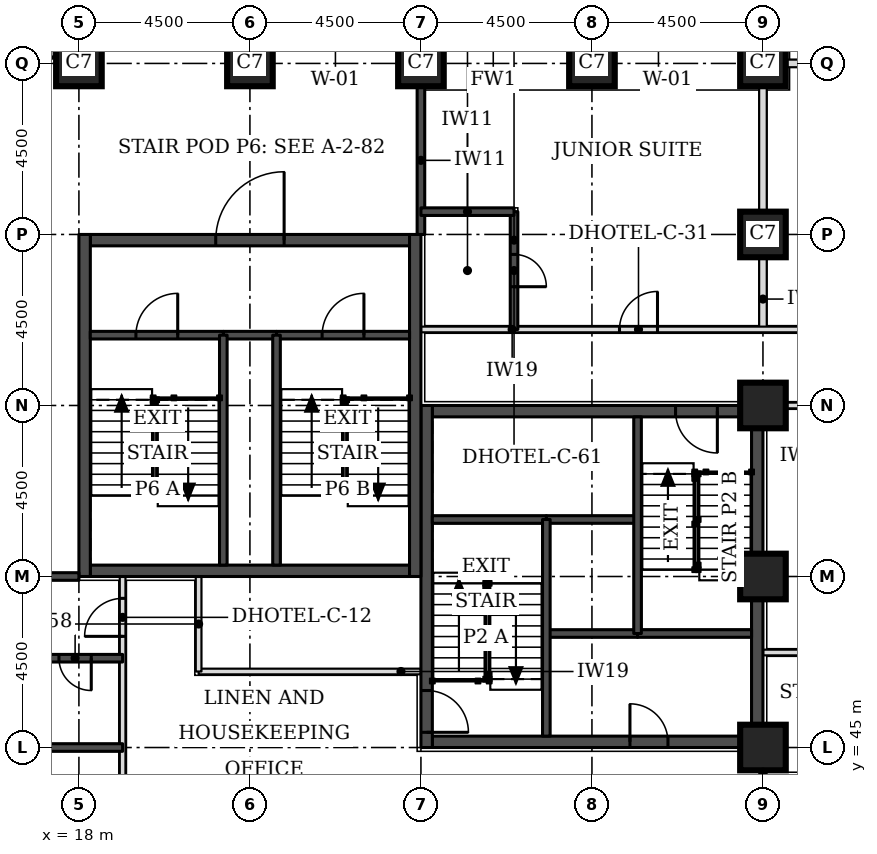
"""IFC4 building model, lengths in metres.
Left out: names, types, materials, properties, quantities, classifications, styles, units other than length and angle.
Written with IfcOpenShell. Run it as: python <this file> out.ifc"""

import sys

from ifc_helpers import new_model, si_unit, direction, frame, frame_2d, origin, origin_2d, place, context, subcontext, project, spatial, rectangle, extrude, element, fill, save


model = new_model("IFC4")
c1 = context("Model", 3, precision=1e-05, world=origin(), true_north=direction((0.0, 1.0)))
c2 = subcontext(c1, "Body", "Model", "MODEL_VIEW")
j1 = project(units=[si_unit("LENGTHUNIT", "METRE"), si_unit("PLANEANGLEUNIT", "RADIAN")], contexts=[c1])
p1 = place(None, origin())
s1 = spatial("IfcSite", under=j1, at=p1, CompositionType="ELEMENT")
p2 = place(p1, origin())
s2 = spatial("IfcBuilding", under=s1, at=p2, CompositionType="ELEMENT")
p3 = place(p2, frame((0.0, 0.0, 56.1)))
s3 = spatial("IfcBuildingStorey", under=s2, at=p3, CompositionType="ELEMENT", Elevation=56.1)
for number, where, z_axis, x_axis in (
    (1, (36.0, 45.0, 0.0), (0.0, 0.0, 1.0), (1.0, 0.0, 0.0)),
    (2, (36.0, 49.5, 0.0), (0.0, 0.0, 1.0), (1.0, 0.0, 0.0)),
    (3, (36.0, 54.0, 0.0), (0.0, 0.0, 1.0), (1.0, 0.0, 0.0)),
    (4, (36.0, 58.5, 0.0), (0.0, 0.0, 1.0), (1.0, 0.0, 0.0)),
    (5, (18.0, 63.0, 0.0), (0.0, 0.0, 1.0), (1.0, 0.0, 0.0)),
    (6, (22.5, 63.0, 0.0), (0.0, 0.0, 1.0), (1.0, 0.0, 0.0)),
    (7, (27.0, 63.0, 0.0), (0.0, 0.0, 1.0), (1.0, 0.0, 0.0)),
    (8, (31.5, 63.0, 0.0), (0.0, 0.0, 1.0), (1.0, 0.0, 0.0)),
    (9, (36.0, 63.0, 0.0), (0.0, 0.0, 1.0), (1.0, 0.0, 0.0)),
):
    element("IfcColumn", number, at=place(p3, frame(where, z_axis=z_axis, x_axis=x_axis)), inside=s3, PredefinedType="COLUMN", context=c2, shape_type="SweptSolid", body=[
        extrude(rectangle(XDim=1.2, YDim=1.2, at=origin_2d()), origin(), (0.0, 0.0, 1.0), 3.3),
    ])
p4 = place(p3, frame((27.3, 45.15, 0.0), z_axis=(0.0, 0.0, 1.0), x_axis=(1.0, 0.0, 0.0)))
e10 = element("IfcWall", 10, at=p4, inside=s3, PredefinedType="SHEAR", context=c2, shape_type="SweptSolid", body=[
    extrude(rectangle(XDim=8.4, YDim=0.3, at=frame_2d((4.2, 0.0))), origin(), (0.0, 0.0, 1.0), 3.3),
])
p5 = place(p4, frame((5.2, 0.0, 0.0)))
e11 = element("IfcOpeningElement", 11, at=p5, cuts=e10, PredefinedType="OPENING", context=c2, shape_type="SweptSolid", body=[
    extrude(rectangle(XDim=1.0, YDim=2.1, at=frame_2d((0.5, 1.05))), frame((0.0, 0.16, 0.0), z_axis=(0.0, -1.0, 0.0), x_axis=(1.0, 0.0, 0.0)), (0.0, 0.0, 1.0), 0.32),
])
p6 = place(p3, frame((27.3, 53.85, 0.0), z_axis=(0.0, 0.0, 1.0), x_axis=(1.0, 0.0, 0.0)))
e12 = element("IfcWall", 12, at=p6, inside=s3, PredefinedType="SHEAR", context=c2, shape_type="SweptSolid", body=[
    extrude(rectangle(XDim=8.4, YDim=0.3, at=frame_2d((4.2, 0.0))), origin(), (0.0, 0.0, 1.0), 3.3),
])
p7 = place(p6, frame((6.4, 0.0, 0.0)))
e13 = element("IfcOpeningElement", 13, at=p7, cuts=e12, PredefinedType="OPENING", context=c2, shape_type="SweptSolid", body=[
    extrude(rectangle(XDim=1.1, YDim=2.1, at=frame_2d((0.55, 1.05))), frame((0.0, 0.16, 0.0), z_axis=(0.0, -1.0, 0.0), x_axis=(1.0, 0.0, 0.0)), (0.0, 0.0, 1.0), 0.32),
])
p8 = place(p3, frame((27.15, 45.0, 0.0), z_axis=(0.0, 0.0, 1.0), x_axis=(0.0, 1.0, 0.0)))
e14 = element("IfcWall", 14, at=p8, inside=s3, PredefinedType="SHEAR", context=c2, shape_type="SweptSolid", body=[
    extrude(rectangle(XDim=9.0, YDim=0.3, at=frame_2d((4.5, 0.0))), origin(), (0.0, 0.0, 1.0), 3.3),
])
p9 = place(p8, frame((0.4, 0.0, 0.0)))
e15 = element("IfcOpeningElement", 15, at=p9, cuts=e14, PredefinedType="OPENING", context=c2, shape_type="SweptSolid", body=[
    extrude(rectangle(XDim=1.1, YDim=2.1, at=frame_2d((0.55, 1.05))), frame((0.0, 0.16, 0.0), z_axis=(0.0, -1.0, 0.0), x_axis=(1.0, 0.0, 0.0)), (0.0, 0.0, 1.0), 0.32),
])
p10 = place(p3, frame((35.85, 45.0, 0.0), z_axis=(0.0, 0.0, 1.0), x_axis=(0.0, 1.0, 0.0)))
e16 = element("IfcWall", 16, at=p10, inside=s3, PredefinedType="SHEAR", context=c2, shape_type="SweptSolid", body=[
    extrude(rectangle(XDim=9.0, YDim=0.3, at=frame_2d((4.5, 0.0))), origin(), (0.0, 0.0, 1.0), 3.3),
])
p11 = place(p3, frame((18.3, 49.65, 0.0), z_axis=(0.0, 0.0, 1.0), x_axis=(1.0, 0.0, 0.0)))
e17 = element("IfcWall", 17, at=p11, inside=s3, PredefinedType="SHEAR", context=c2, shape_type="SweptSolid", body=[
    extrude(rectangle(XDim=8.4, YDim=0.3, at=frame_2d((4.2, 0.0))), origin(), (0.0, 0.0, 1.0), 3.3),
])
p12 = place(p3, frame((18.3, 58.35, 0.0), z_axis=(0.0, 0.0, 1.0), x_axis=(1.0, 0.0, 0.0)))
e18 = element("IfcWall", 18, at=p12, inside=s3, PredefinedType="SHEAR", context=c2, shape_type="SweptSolid", body=[
    extrude(rectangle(XDim=8.4, YDim=0.3, at=frame_2d((4.2, 0.0))), origin(), (0.0, 0.0, 1.0), 3.3),
])
p13 = place(p12, frame((3.3, 0.0, 0.0)))
e19 = element("IfcOpeningElement", 19, at=p13, cuts=e18, PredefinedType="OPENING", context=c2, shape_type="SweptSolid", body=[
    extrude(rectangle(XDim=1.8, YDim=2.1, at=frame_2d((0.9, 1.05))), frame((0.0, 0.16, 0.0), z_axis=(0.0, -1.0, 0.0), x_axis=(1.0, 0.0, 0.0)), (0.0, 0.0, 1.0), 0.32),
])
for number, where, z_axis, x_axis in (
    (20, (18.15, 49.5, 0.0), (0.0, 0.0, 1.0), (0.0, 1.0, 0.0)),
    (21, (26.85, 49.5, 0.0), (0.0, 0.0, 1.0), (0.0, 1.0, 0.0)),
):
    element("IfcWall", number, at=place(p3, frame(where, z_axis=z_axis, x_axis=x_axis)), inside=s3, PredefinedType="SHEAR", context=c2, shape_type="SweptSolid", body=[
        extrude(rectangle(XDim=9.0, YDim=0.3, at=frame_2d((4.5, 0.0))), origin(), (0.0, 0.0, 1.0), 3.3),
    ])
p14 = place(p3, frame((17.73, 63.826, 0.0), z_axis=(0.0, 0.0, 1.0), x_axis=(-0.707106781187, -0.707106781187, 0.0)))
e22 = element("IfcWall", 22, at=p14, inside=s3, PredefinedType="STANDARD", context=c2, shape_type="SweptSolid", body=[
    extrude(rectangle(XDim=7.151, YDim=0.35, at=frame_2d((3.576, 0.0))), origin(), (0.0, 0.0, 1.0), 3.055),
])
p15 = place(p14, frame((1.926, 0.0, 0.8)))
e23 = element("IfcOpeningElement", 23, at=p15, cuts=e22, PredefinedType="OPENING", context=c2, shape_type="SweptSolid", body=[
    extrude(rectangle(XDim=3.3, YDim=1.5, at=frame_2d((1.65, 0.75))), frame((0.0, 0.185, 0.0), z_axis=(0.0, -1.0, 0.0), x_axis=(1.0, 0.0, 0.0)), (0.0, 0.0, 1.0), 0.37),
])
p16 = place(p3, frame((36.0, 56.0, 0.0), z_axis=(0.0, 0.0, 1.0), x_axis=(0.0, 1.0, 0.0)))
e24 = element("IfcWall", 24, at=p16, inside=s3, PredefinedType="PARTITIONING", context=c2, shape_type="SweptSolid", body=[
    extrude(rectangle(XDim=6.4, YDim=0.2, at=frame_2d((3.2, 0.0))), origin(), (0.0, 0.0, 1.0), 2.33),
])
p17 = place(p3, frame((36.6, 63.0, 0.0), z_axis=(0.0, 0.0, 1.0), x_axis=(1.0, 0.0, 0.0)))
e25 = element("IfcWall", 25, at=p17, inside=s3, PredefinedType="PARTITIONING", context=c2, shape_type="SweptSolid", body=[
    extrude(rectangle(XDim=6.4, YDim=0.2, at=frame_2d((3.2, 0.0))), origin(), (0.0, 0.0, 1.0), 3.08),
])
p18 = place(p3, frame((19.15, 25.15, 0.0), z_axis=(0.0, 0.0, 1.0), x_axis=(0.0, 1.0, 0.0)))
e26 = element("IfcWall", 26, at=p18, inside=s3, PredefinedType="PARTITIONING", context=c2, shape_type="SweptSolid", body=[
    extrude(rectangle(XDim=24.35, YDim=0.15, at=frame_2d((12.175, 0.0))), origin(), (0.0, 0.0, 1.0), 3.08),
])
p19 = place(p18, frame((0.347, 0.0, 0.0)))
e27 = element("IfcOpeningElement", 27, at=p19, cuts=e26, PredefinedType="OPENING", context=c2, shape_type="SweptSolid", body=[
    extrude(rectangle(XDim=1.0, YDim=2.1, at=frame_2d((0.5, 1.05))), frame((0.0, 0.085, 0.0), z_axis=(0.0, -1.0, 0.0), x_axis=(1.0, 0.0, 0.0)), (0.0, 0.0, 1.0), 0.17),
])
p20 = place(p18, frame((4.775, 0.0, 0.0)))
e28 = element("IfcOpeningElement", 28, at=p20, cuts=e26, PredefinedType="OPENING", context=c2, shape_type="SweptSolid", body=[
    extrude(rectangle(XDim=1.0, YDim=2.1, at=frame_2d((0.5, 1.05))), frame((0.0, 0.085, 0.0), z_axis=(0.0, -1.0, 0.0), x_axis=(1.0, 0.0, 0.0)), (0.0, 0.0, 1.0), 0.17),
])
p21 = place(p18, frame((7.175, 0.0, 0.0)))
e29 = element("IfcOpeningElement", 29, at=p21, cuts=e26, PredefinedType="OPENING", context=c2, shape_type="SweptSolid", body=[
    extrude(rectangle(XDim=1.0, YDim=2.1, at=frame_2d((0.5, 1.05))), frame((0.0, 0.085, 0.0), z_axis=(0.0, -1.0, 0.0), x_axis=(1.0, 0.0, 0.0)), (0.0, 0.0, 1.0), 0.17),
])
p22 = place(p18, frame((13.75, 0.0, 0.0)))
e30 = element("IfcOpeningElement", 30, at=p22, cuts=e26, PredefinedType="OPENING", context=c2, shape_type="SweptSolid", body=[
    extrude(rectangle(XDim=1.0, YDim=2.1, at=frame_2d((0.5, 1.05))), frame((0.0, 0.085, 0.0), z_axis=(0.0, -1.0, 0.0), x_axis=(1.0, 0.0, 0.0)), (0.0, 0.0, 1.0), 0.17),
])
p23 = place(p18, frame((16.175, 0.0, 0.0)))
e31 = element("IfcOpeningElement", 31, at=p23, cuts=e26, PredefinedType="OPENING", context=c2, shape_type="SweptSolid", body=[
    extrude(rectangle(XDim=1.0, YDim=2.1, at=frame_2d((0.5, 1.05))), frame((0.0, 0.085, 0.0), z_axis=(0.0, -1.0, 0.0), x_axis=(1.0, 0.0, 0.0)), (0.0, 0.0, 1.0), 0.17),
])
p24 = place(p18, frame((22.775, 0.0, 0.0)))
e32 = element("IfcOpeningElement", 32, at=p24, cuts=e26, PredefinedType="OPENING", context=c2, shape_type="SweptSolid", body=[
    extrude(rectangle(XDim=1.0, YDim=2.1, at=frame_2d((0.5, 1.05))), frame((0.0, 0.085, 0.0), z_axis=(0.0, -1.0, 0.0), x_axis=(1.0, 0.0, 0.0)), (0.0, 0.0, 1.0), 0.17),
])
p25 = place(p3, frame((36.0, 40.55, 0.0), z_axis=(0.0, 0.0, 1.0), x_axis=(0.0, 1.0, 0.0)))
e33 = element("IfcWall", 33, at=p25, inside=s3, PredefinedType="PARTITIONING", context=c2, shape_type="SweptSolid", body=[
    extrude(rectangle(XDim=4.4, YDim=0.15, at=frame_2d((2.2, 0.0))), origin(), (0.0, 0.0, 1.0), 2.33),
])
p26 = place(p3, frame((21.15, 47.0, 0.0), z_axis=(0.0, 0.0, 1.0), x_axis=(1.0, 0.0, 0.0)))
e34 = element("IfcWall", 34, at=p26, inside=s3, PredefinedType="PARTITIONING", context=c2, shape_type="SweptSolid", body=[
    extrude(rectangle(XDim=5.85, YDim=0.15, at=frame_2d((2.925, 0.0))), origin(), (0.0, 0.0, 1.0), 3.08),
])
p27 = place(p3, frame((21.15, 47.0, 0.0), z_axis=(0.0, 0.0, 1.0), x_axis=(0.0, 1.0, 0.0)))
e35 = element("IfcWall", 35, at=p27, inside=s3, PredefinedType="PARTITIONING", context=c2, shape_type="SweptSolid", body=[
    extrude(rectangle(XDim=2.5, YDim=0.15, at=frame_2d((1.25, 0.0))), origin(), (0.0, 0.0, 1.0), 3.08),
])
p28 = place(p3, frame((36.05, 54.0, 0.0), z_axis=(0.0, 0.0, 1.0), x_axis=(1.0, 0.0, 0.0)))
e36 = element("IfcWall", 36, at=p28, inside=s3, PredefinedType="PARTITIONING", context=c2, shape_type="SweptSolid", body=[
    extrude(rectangle(XDim=6.95, YDim=0.15, at=frame_2d((3.475, 0.0))), origin(), (0.0, 0.0, 1.0), 3.08),
])
p29 = place(p28, frame((3.0, 0.0, 0.0)))
e37 = element("IfcOpeningElement", 37, at=p29, cuts=e36, PredefinedType="OPENING", context=c2, shape_type="SweptSolid", body=[
    extrude(rectangle(XDim=0.9, YDim=2.1, at=frame_2d((0.45, 1.05))), frame((0.0, 0.085, 0.0), z_axis=(0.0, -1.0, 0.0), x_axis=(1.0, 0.0, 0.0)), (0.0, 0.0, 1.0), 0.17),
])
p30 = place(p3, frame((27.0, 56.0, 0.0), z_axis=(0.0, 0.0, 1.0), x_axis=(1.0, 0.0, 0.0)))
e38 = element("IfcWall", 38, at=p30, inside=s3, PredefinedType="PARTITIONING", context=c2, shape_type="SweptSolid", body=[
    extrude(rectangle(XDim=16.0, YDim=0.15, at=frame_2d((8.0, 0.0))), origin(), (0.0, 0.0, 1.0), 3.08),
])
p31 = place(p30, frame((5.225, 0.0, 0.0)))
e39 = element("IfcOpeningElement", 39, at=p31, cuts=e38, PredefinedType="OPENING", context=c2, shape_type="SweptSolid", body=[
    extrude(rectangle(XDim=1.0, YDim=2.1, at=frame_2d((0.5, 1.05))), frame((0.0, 0.085, 0.0), z_axis=(0.0, -1.0, 0.0), x_axis=(1.0, 0.0, 0.0)), (0.0, 0.0, 1.0), 0.17),
])
p32 = place(p3, frame((14.1, 45.0, 0.0), z_axis=(0.0, 0.0, 1.0), x_axis=(1.0, 0.0, 0.0)))
e40 = element("IfcWall", 40, at=p32, inside=s3, PredefinedType="SOLIDWALL", context=c2, shape_type="SweptSolid", body=[
    extrude(rectangle(XDim=5.05, YDim=0.2, at=frame_2d((2.525, 0.0))), origin(), (0.0, 0.0, 1.0), 3.08),
])
p33 = place(p3, frame((16.65, 47.35, 0.0), z_axis=(0.0, 0.0, 1.0), x_axis=(1.0, 0.0, 0.0)))
e41 = element("IfcWall", 41, at=p33, inside=s3, PredefinedType="SOLIDWALL", context=c2, shape_type="SweptSolid", body=[
    extrude(rectangle(XDim=2.5, YDim=0.2, at=frame_2d((1.25, 0.0))), origin(), (0.0, 0.0, 1.0), 3.08),
])
p34 = place(p33, frame((0.825, 0.0, 0.0)))
e42 = element("IfcOpeningElement", 42, at=p34, cuts=e41, PredefinedType="OPENING", context=c2, shape_type="SweptSolid", body=[
    extrude(rectangle(XDim=0.85, YDim=2.1, at=frame_2d((0.425, 1.05))), frame((0.0, 0.11, 0.0), z_axis=(0.0, -1.0, 0.0), x_axis=(1.0, 0.0, 0.0)), (0.0, 0.0, 1.0), 0.22),
])
for number, where, z_axis, x_axis in (
    (43, (14.1, 49.5, 0.0), (0.0, 0.0, 1.0), (1.0, 0.0, 0.0)),
    (44, (27.0, 58.5, 0.0), (0.0, 0.0, 1.0), (0.0, 1.0, 0.0)),
):
    element("IfcWall", number, at=place(p3, frame(where, z_axis=z_axis, x_axis=x_axis)), inside=s3, PredefinedType="SOLIDWALL", context=c2, shape_type="SweptSolid", body=[
        extrude(rectangle(XDim=3.9, YDim=0.2, at=frame_2d((1.95, 0.0))), origin(), (0.0, 0.0, 1.0), 3.08),
    ])
p35 = place(p3, frame((29.45, 56.0, 0.0), z_axis=(0.0, 0.0, 1.0), x_axis=(0.0, 1.0, 0.0)))
e45 = element("IfcWall", 45, at=p35, inside=s3, PredefinedType="SOLIDWALL", context=c2, shape_type="SweptSolid", body=[
    extrude(rectangle(XDim=3.1, YDim=0.2, at=frame_2d((1.55, 0.0))), origin(), (0.0, 0.0, 1.0), 3.08),
])
p36 = place(p35, frame((1.125, 0.0, 0.0)))
e46 = element("IfcOpeningElement", 46, at=p36, cuts=e45, PredefinedType="OPENING", context=c2, shape_type="SweptSolid", body=[
    extrude(rectangle(XDim=0.85, YDim=2.1, at=frame_2d((0.425, 1.05))), frame((0.0, 0.11, 0.0), z_axis=(0.0, -1.0, 0.0), x_axis=(1.0, 0.0, 0.0)), (0.0, 0.0, 1.0), 0.22),
])
p37 = place(p3, frame((27.0, 59.1, 0.0), z_axis=(0.0, 0.0, 1.0), x_axis=(1.0, 0.0, 0.0)))
e47 = element("IfcWall", 47, at=p37, inside=s3, PredefinedType="SOLIDWALL", context=c2, shape_type="SweptSolid", body=[
    extrude(rectangle(XDim=2.45, YDim=0.2, at=frame_2d((1.225, 0.0))), origin(), (0.0, 0.0, 1.0), 3.08),
])
p38 = place(p3, frame((36.0, 47.5, 0.0), z_axis=(0.0, 0.0, 1.0), x_axis=(1.0, 0.0, 0.0)))
e48 = element("IfcWall", 48, at=p38, inside=s3, PredefinedType="PARTITIONING", context=c2, shape_type="SweptSolid", body=[
    extrude(rectangle(XDim=7.0, YDim=0.15, at=frame_2d((3.5, 0.0))), origin(), (0.0, 0.0, 1.0), 3.08),
])
p39 = place(p3, frame((30.3, 48.0, 0.0), z_axis=(0.0, 0.0, 1.0), x_axis=(1.0, 0.0, 0.0)))
e49 = element("IfcWall", 49, at=p39, inside=s3, PredefinedType="SOLIDWALL", context=c2, shape_type="SweptSolid", body=[
    extrude(rectangle(XDim=2.4, YDim=0.2, at=frame_2d((1.2, 0.0))), origin(), (0.0, 0.0, 1.0), 3.08),
])
p40 = place(p3, frame((32.7, 48.0, 0.0), z_axis=(0.0, 0.0, 1.0), x_axis=(1.0, 0.0, 0.0)))
e50 = element("IfcWall", 50, at=p40, inside=s3, PredefinedType="SOLIDWALL", context=c2, shape_type="SweptSolid", body=[
    extrude(rectangle(XDim=3.0, YDim=0.2, at=frame_2d((1.5, 0.0))), origin(), (0.0, 0.0, 1.0), 3.08),
])
p41 = place(p3, frame((30.3, 51.0, 0.0), z_axis=(0.0, 0.0, 1.0), x_axis=(1.0, 0.0, 0.0)))
e51 = element("IfcWall", 51, at=p41, inside=s3, PredefinedType="SOLIDWALL", context=c2, shape_type="SweptSolid", body=[
    extrude(rectangle(XDim=2.4, YDim=0.2, at=frame_2d((1.2, 0.0))), origin(), (0.0, 0.0, 1.0), 3.3),
])
p42 = place(p3, frame((27.3, 51.0, 0.0), z_axis=(0.0, 0.0, 1.0), x_axis=(1.0, 0.0, 0.0)))
e52 = element("IfcWall", 52, at=p42, inside=s3, PredefinedType="SOLIDWALL", context=c2, shape_type="SweptSolid", body=[
    extrude(rectangle(XDim=3.0, YDim=0.2, at=frame_2d((1.5, 0.0))), origin(), (0.0, 0.0, 1.0), 3.08),
])
for number, where, z_axis, x_axis in (
    (53, (30.3, 45.3, 0.0), (0.0, 0.0, 1.0), (0.0, 1.0, 0.0)),
    (54, (32.7, 48.0, 0.0), (0.0, 0.0, 1.0), (0.0, 1.0, 0.0)),
):
    element("IfcWall", number, at=place(p3, frame(where, z_axis=z_axis, x_axis=x_axis)), inside=s3, PredefinedType="SOLIDWALL", context=c2, shape_type="SweptSolid", body=[
        extrude(rectangle(XDim=5.7, YDim=0.2, at=frame_2d((2.85, 0.0))), origin(), (0.0, 0.0, 1.0), 3.08),
    ])
p43 = place(p3, frame((21.8, 55.85, 0.0), z_axis=(0.0, 0.0, 1.0), x_axis=(1.0, 0.0, 0.0)))
e55 = element("IfcWall", 55, at=p43, inside=s3, PredefinedType="SOLIDWALL", context=c2, shape_type="SweptSolid", body=[
    extrude(rectangle(XDim=1.4, YDim=0.2, at=frame_2d((0.7, 0.0))), origin(), (0.0, 0.0, 1.0), 3.08),
])
p44 = place(p3, frame((18.3, 55.85, 0.0), z_axis=(0.0, 0.0, 1.0), x_axis=(1.0, 0.0, 0.0)))
e56 = element("IfcWall", 56, at=p44, inside=s3, PredefinedType="SOLIDWALL", context=c2, shape_type="SweptSolid", body=[
    extrude(rectangle(XDim=3.5, YDim=0.2, at=frame_2d((1.75, 0.0))), origin(), (0.0, 0.0, 1.0), 3.08),
])
p45 = place(p44, frame((1.2, 0.0, 0.0)))
e57 = element("IfcOpeningElement", 57, at=p45, cuts=e56, PredefinedType="OPENING", context=c2, shape_type="SweptSolid", body=[
    extrude(rectangle(XDim=1.1, YDim=2.1, at=frame_2d((0.55, 1.05))), frame((0.0, 0.11, 0.0), z_axis=(0.0, -1.0, 0.0), x_axis=(1.0, 0.0, 0.0)), (0.0, 0.0, 1.0), 0.22),
])
p46 = place(p3, frame((23.2, 55.85, 0.0), z_axis=(0.0, 0.0, 1.0), x_axis=(1.0, 0.0, 0.0)))
e58 = element("IfcWall", 58, at=p46, inside=s3, PredefinedType="SOLIDWALL", context=c2, shape_type="SweptSolid", body=[
    extrude(rectangle(XDim=3.5, YDim=0.2, at=frame_2d((1.75, 0.0))), origin(), (0.0, 0.0, 1.0), 3.08),
])
p47 = place(p46, frame((1.2, 0.0, 0.0)))
e59 = element("IfcOpeningElement", 59, at=p47, cuts=e58, PredefinedType="OPENING", context=c2, shape_type="SweptSolid", body=[
    extrude(rectangle(XDim=1.1, YDim=2.1, at=frame_2d((0.55, 1.05))), frame((0.0, 0.11, 0.0), z_axis=(0.0, -1.0, 0.0), x_axis=(1.0, 0.0, 0.0)), (0.0, 0.0, 1.0), 0.22),
])
for number, where, z_axis, x_axis in (
    (60, (21.8, 49.8, 0.0), (0.0, 0.0, 1.0), (0.0, 1.0, 0.0)),
    (61, (23.2, 49.8, 0.0), (0.0, 0.0, 1.0), (0.0, 1.0, 0.0)),
):
    element("IfcWall", number, at=place(p3, frame(where, z_axis=z_axis, x_axis=x_axis)), inside=s3, PredefinedType="SOLIDWALL", context=c2, shape_type="SweptSolid", body=[
        extrude(rectangle(XDim=6.05, YDim=0.2, at=frame_2d((3.025, 0.0))), origin(), (0.0, 0.0, 1.0), 3.08),
    ])
p48 = place(p24, origin())
e62 = element("IfcDoor", 62, at=p48, inside=s3, OperationType="SINGLE_SWING_LEFT", PredefinedType="DOOR", context=c2, shape_type="SweptSolid", body=[
    extrude(rectangle(XDim=1.0, YDim=2.1, at=frame_2d((0.5, 1.05))), frame((0.0, 0.025, 0.0), z_axis=(0.0, -1.0, 0.0), x_axis=(1.0, 0.0, 0.0)), (0.0, 0.0, 1.0), 0.05),
])
fill(e32, e62)
p49 = place(p34, frame((0.85, 0.0, 0.0), z_axis=(0.0, 0.0, 1.0), x_axis=(-1.0, 0.0, 0.0)))
e63 = element("IfcDoor", 63, at=p49, inside=s3, OperationType="SINGLE_SWING_LEFT", PredefinedType="DOOR", context=c2, shape_type="SweptSolid", body=[
    extrude(rectangle(XDim=0.85, YDim=2.1, at=frame_2d((0.425, 1.05))), frame((0.0, 0.025, 0.0), z_axis=(0.0, -1.0, 0.0), x_axis=(1.0, 0.0, 0.0)), (0.0, 0.0, 1.0), 0.05),
])
fill(e42, e63)
p50 = place(p31, origin())
e64 = element("IfcDoor", 64, at=p50, inside=s3, OperationType="SINGLE_SWING_RIGHT", PredefinedType="DOOR", context=c2, shape_type="SweptSolid", body=[
    extrude(rectangle(XDim=1.0, YDim=2.1, at=frame_2d((0.5, 1.05))), frame((0.0, 0.025, 0.0), z_axis=(0.0, -1.0, 0.0), x_axis=(1.0, 0.0, 0.0)), (0.0, 0.0, 1.0), 0.05),
])
fill(e39, e64)
p51 = place(p36, frame((0.85, 0.0, 0.0), z_axis=(0.0, 0.0, 1.0), x_axis=(-1.0, 0.0, 0.0)))
e65 = element("IfcDoor", 65, at=p51, inside=s3, OperationType="SINGLE_SWING_RIGHT", PredefinedType="DOOR", context=c2, shape_type="SweptSolid", body=[
    extrude(rectangle(XDim=0.85, YDim=2.1, at=frame_2d((0.425, 1.05))), frame((0.0, 0.025, 0.0), z_axis=(0.0, -1.0, 0.0), x_axis=(1.0, 0.0, 0.0)), (0.0, 0.0, 1.0), 0.05),
])
fill(e46, e65)
p52 = place(p9, frame((1.1, 0.0, 0.0), z_axis=(0.0, 0.0, 1.0), x_axis=(-1.0, 0.0, 0.0)))
e66 = element("IfcDoor", 66, at=p52, inside=s3, OperationType="SINGLE_SWING_RIGHT", PredefinedType="DOOR", context=c2, shape_type="SweptSolid", body=[
    extrude(rectangle(XDim=1.1, YDim=2.1, at=frame_2d((0.55, 1.05))), frame((0.0, 0.025, 0.0), z_axis=(0.0, -1.0, 0.0), x_axis=(1.0, 0.0, 0.0)), (0.0, 0.0, 1.0), 0.05),
])
fill(e15, e66)
p53 = place(p7, frame((1.1, 0.0, 0.0), z_axis=(0.0, 0.0, 1.0), x_axis=(-1.0, 0.0, 0.0)))
e67 = element("IfcDoor", 67, at=p53, inside=s3, OperationType="SINGLE_SWING_LEFT", PredefinedType="DOOR", context=c2, shape_type="SweptSolid", body=[
    extrude(rectangle(XDim=1.1, YDim=2.1, at=frame_2d((0.55, 1.05))), frame((0.0, 0.025, 0.0), z_axis=(0.0, -1.0, 0.0), x_axis=(1.0, 0.0, 0.0)), (0.0, 0.0, 1.0), 0.05),
])
fill(e13, e67)
p54 = place(p5, origin())
e68 = element("IfcDoor", 68, at=p54, inside=s3, OperationType="SINGLE_SWING_LEFT", PredefinedType="DOOR", context=c2, shape_type="SweptSolid", body=[
    extrude(rectangle(XDim=1.0, YDim=2.1, at=frame_2d((0.5, 1.05))), frame((0.0, 0.025, 0.0), z_axis=(0.0, -1.0, 0.0), x_axis=(1.0, 0.0, 0.0)), (0.0, 0.0, 1.0), 0.05),
])
fill(e11, e68)
p55 = place(p45, origin())
e69 = element("IfcDoor", 69, at=p55, inside=s3, OperationType="SINGLE_SWING_RIGHT", PredefinedType="DOOR", context=c2, shape_type="SweptSolid", body=[
    extrude(rectangle(XDim=1.1, YDim=2.1, at=frame_2d((0.55, 1.05))), frame((0.0, 0.025, 0.0), z_axis=(0.0, -1.0, 0.0), x_axis=(1.0, 0.0, 0.0)), (0.0, 0.0, 1.0), 0.05),
])
fill(e57, e69)
p56 = place(p47, origin())
e70 = element("IfcDoor", 70, at=p56, inside=s3, OperationType="SINGLE_SWING_RIGHT", PredefinedType="DOOR", context=c2, shape_type="SweptSolid", body=[
    extrude(rectangle(XDim=1.1, YDim=2.1, at=frame_2d((0.55, 1.05))), frame((0.0, 0.025, 0.0), z_axis=(0.0, -1.0, 0.0), x_axis=(1.0, 0.0, 0.0)), (0.0, 0.0, 1.0), 0.05),
])
fill(e59, e70)
p57 = place(p13, origin())
e71 = element("IfcDoor", 71, at=p57, inside=s3, OperationType="SINGLE_SWING_RIGHT", PredefinedType="DOOR", context=c2, shape_type="SweptSolid", body=[
    extrude(rectangle(XDim=1.8, YDim=2.1, at=frame_2d((0.9, 1.05))), frame((0.0, 0.025, 0.0), z_axis=(0.0, -1.0, 0.0), x_axis=(1.0, 0.0, 0.0)), (0.0, 0.0, 1.0), 0.05),
])
fill(e19, e71)
save(model, sys.argv[1])
